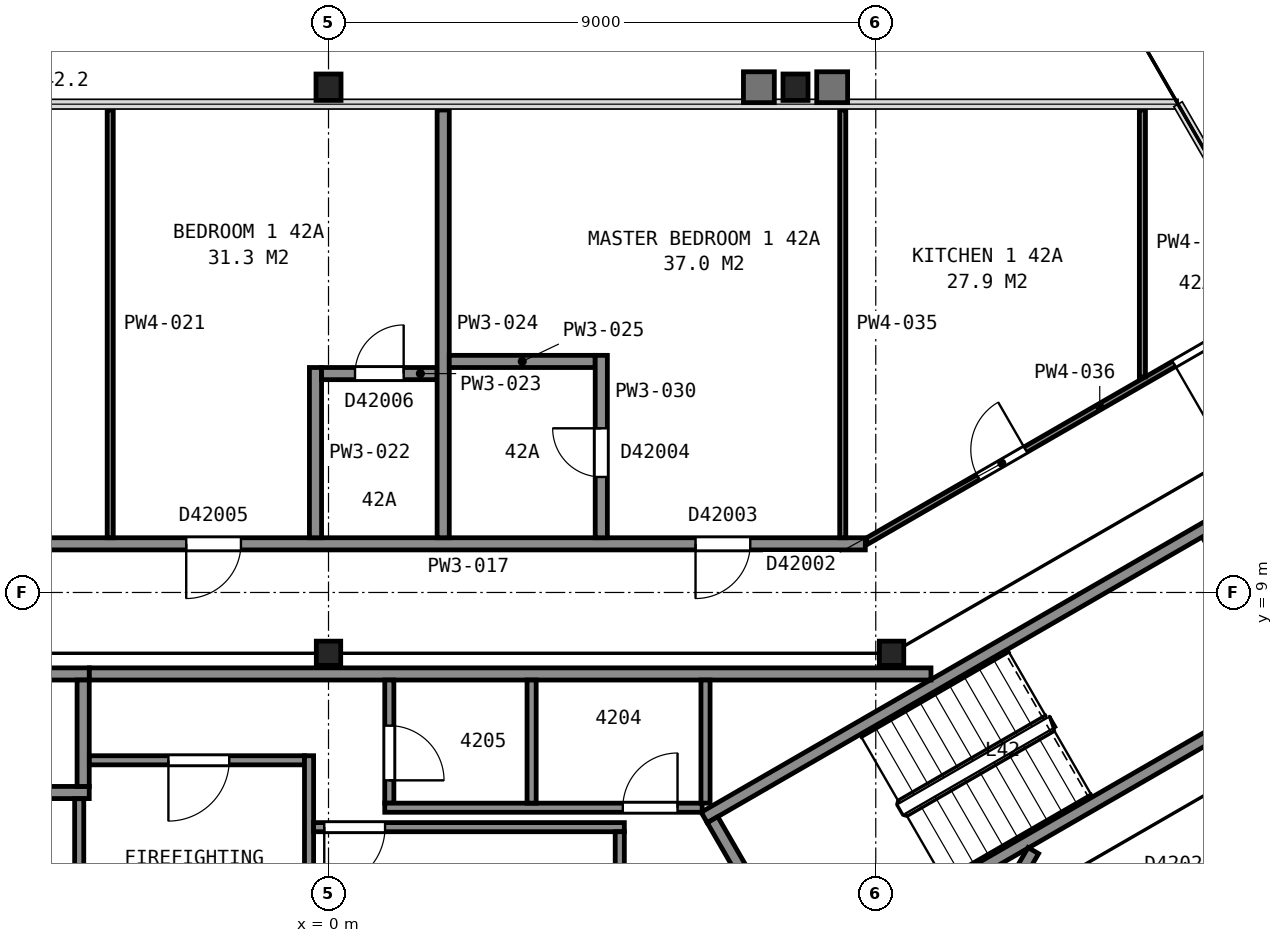
"""IFC4 building model, lengths in metres.
Left out: names, types, materials, properties, quantities, classifications, styles, units other than length and angle.
Written with IfcOpenShell. Run it as: python <this file> out.ifc"""

import sys

from ifc_helpers import new_model, si_unit, direction, frame, frame_2d, origin, origin_2d, place, context, subcontext, project, spatial, rectangle, i_section, extrude, element, fill, save


model = new_model("IFC4")
c1 = context("Model", 3, precision=1e-05, world=origin(), true_north=direction((0.0, 1.0)))
c2 = subcontext(c1, "Body", "Model", "MODEL_VIEW")
j1 = project(units=[si_unit("LENGTHUNIT", "METRE"), si_unit("PLANEANGLEUNIT", "RADIAN")], contexts=[c1])
p1 = place(None, origin())
s1 = spatial("IfcSite", under=j1, at=p1, CompositionType="ELEMENT")
p2 = place(p1, origin())
s2 = spatial("IfcBuilding", under=s1, at=p2, CompositionType="ELEMENT")
p3 = place(p2, frame((0.0, 0.0, 171.0)))
s3 = spatial("IfcBuildingStorey", under=s2, at=p3, CompositionType="ELEMENT", Elevation=171.0)
for number, where, z_axis, x_axis in (
    (1, (7.68, 17.31, 0.0), (0.0, 0.0, 1.0), (1.0, 0.0, 0.0)),
    (2, (0.0, 17.31, 0.0), (0.0, 0.0, 1.0), (1.0, 0.0, 0.0)),
):
    element("IfcColumn", number, at=place(p3, frame(where, z_axis=z_axis, x_axis=x_axis)), inside=s3, PredefinedType="COLUMN", context=c2, shape_type="SweptSolid", body=[
        extrude(i_section(OverallWidth=0.411, OverallDepth=0.434, WebThickness=0.036, FlangeThickness=0.057, FilletRadius=0.015, at=origin_2d()), origin(), (0.0, 0.0, 1.0), 3.665),
    ])
for number, where, z_axis, x_axis in (
    (3, (9.26, 8.0, 0.0), (0.0, 0.0, 1.0), (1.0, 0.0, 0.0)),
    (4, (0.0, 8.0, 0.0), (0.0, 0.0, 1.0), (1.0, 0.0, 0.0)),
):
    element("IfcColumn", number, at=place(p3, frame(where, z_axis=z_axis, x_axis=x_axis)), inside=s3, PredefinedType="COLUMN", context=c2, shape_type="SweptSolid", body=[
        extrude(i_section(OverallWidth=0.401, OverallDepth=0.399, WebThickness=0.025, FlangeThickness=0.04, FilletRadius=0.015, at=origin_2d()), origin(), (0.0, 0.0, 1.0), 3.7),
    ])
p4 = place(p3, frame((15.855, 7.538, 0.0), z_axis=(0.0, 0.0, 1.0), x_axis=(-0.500049511043, 0.865996816683, 0.0)))
e5 = element("IfcWall", 5, at=p4, inside=s3, PredefinedType="PARTITIONING", context=c2, shape_type="SweptSolid", body=[
    extrude(rectangle(XDim=2.8, YDim=0.2, at=frame_2d((1.4, 0.0))), origin(), (0.0, 0.0, 1.0), 3.45),
])
p5 = place(p4, frame((0.85, 0.0, 0.0)))
e6 = element("IfcOpeningElement", 6, at=p5, cuts=e5, PredefinedType="OPENING", context=c2, shape_type="SweptSolid", body=[
    extrude(rectangle(XDim=1.1, YDim=2.1, at=frame_2d((0.55, 1.05))), frame((0.0, 0.11, 0.0), z_axis=(0.0, -1.0, 0.0), x_axis=(1.0, 0.0, 0.0)), (0.0, 0.0, 1.0), 0.22),
])
for number, where, z_axis, x_axis in (
    (7, (6.178, 5.299, 0.0), (0.0, 0.0, 1.0), (0.866, 0.5, 0.0)),
    (8, (7.678, 2.701, 0.0), (0.0, 0.0, 1.0), (0.866, 0.5, 0.0)),
):
    element("IfcWall", number, at=place(p3, frame(where, z_axis=z_axis, x_axis=x_axis)), inside=s3, PredefinedType="PARTITIONING", context=c2, shape_type="SweptSolid", body=[
        extrude(rectangle(XDim=9.6, YDim=0.2, at=frame_2d((4.8, 0.0))), origin(), (0.0, 0.0, 1.0), 3.45),
    ])
p6 = place(p3, frame((7.715, 2.838, 0.0), z_axis=(0.0, 0.0, 1.0), x_axis=(-0.500049511043, 0.865996816683, 0.0)))
e9 = element("IfcWall", 9, at=p6, inside=s3, PredefinedType="PARTITIONING", context=c2, shape_type="SweptSolid", body=[
    extrude(rectangle(XDim=2.8, YDim=0.2, at=frame_2d((1.4, 0.0))), origin(), (0.0, 0.0, 1.0), 3.45),
])
for number, where, z_axis, x_axis in (
    (10, (-6.285, 5.71, 0.0), (0.0, 0.0, 1.0), (1.0, 0.0, 0.0)),
    (11, (-6.285, 7.66, 0.0), (0.0, 0.0, 1.0), (1.0, 0.0, 0.0)),
):
    element("IfcWall", number, at=place(p3, frame(where, z_axis=z_axis, x_axis=x_axis)), inside=s3, PredefinedType="PARTITIONING", context=c2, shape_type="SweptSolid", body=[
        extrude(rectangle(XDim=2.35, YDim=0.2, at=frame_2d((1.175, 0.0))), origin(), (0.0, 0.0, 1.0), 3.7),
    ])
p7 = place(p3, frame((-4.035, 5.81, 0.0), z_axis=(0.0, 0.0, 1.0), x_axis=(0.0, 1.0, 0.0)))
e12 = element("IfcWall", 12, at=p7, inside=s3, PredefinedType="PARTITIONING", context=c2, shape_type="SweptSolid", body=[
    extrude(rectangle(XDim=1.75, YDim=0.2, at=frame_2d((0.875, 0.0))), origin(), (0.0, 0.0, 1.0), 3.7),
])
p8 = place(p3, frame((-4.1, 2.085, 0.0), z_axis=(0.0, 0.0, 1.0), x_axis=(0.0, 1.0, 0.0)))
e13 = element("IfcWall", 13, at=p8, inside=s3, PredefinedType="PARTITIONING", context=c2, shape_type="SweptSolid", body=[
    extrude(rectangle(XDim=3.523, YDim=0.15, at=frame_2d((1.761, 0.0))), origin(), (0.0, 0.0, 1.0), 3.45),
])
p9 = place(p3, frame((-3.933, 6.24, 0.0), z_axis=(0.0, 0.0, 1.0), x_axis=(1.0, 0.0, 0.0)))
e14 = element("IfcWall", 14, at=p9, inside=s3, PredefinedType="PARTITIONING", context=c2, shape_type="SweptSolid", body=[
    extrude(rectangle(XDim=3.538, YDim=0.15, at=frame_2d((1.769, 0.0))), origin(), (0.0, 0.0, 1.0), 3.45),
])
p10 = place(p9, frame((1.3, 0.0, 0.0)))
e15 = element("IfcOpeningElement", 15, at=p10, cuts=e14, PredefinedType="OPENING", context=c2, shape_type="SweptSolid", body=[
    extrude(rectangle(XDim=1.0, YDim=2.1, at=frame_2d((0.5, 1.05))), frame((0.0, 0.085, 0.0), z_axis=(0.0, -1.0, 0.0), x_axis=(1.0, 0.0, 0.0)), (0.0, 0.0, 1.0), 0.17),
])
p11 = place(p3, frame((-3.933, 7.66, 0.0), z_axis=(0.0, 0.0, 1.0), x_axis=(1.0, 0.0, 0.0)))
e16 = element("IfcWall", 16, at=p11, inside=s3, PredefinedType="PARTITIONING", context=c2, shape_type="SweptSolid", body=[
    extrude(rectangle(XDim=13.841, YDim=0.2, at=frame_2d((6.92, 0.0))), origin(), (0.0, 0.0, 1.0), 3.45),
])
p12 = place(p3, frame((-0.32, 2.252, 0.0), z_axis=(0.0, 0.0, 1.0), x_axis=(0.0, 1.0, 0.0)))
e17 = element("IfcWall", 17, at=p12, inside=s3, PredefinedType="PARTITIONING", context=c2, shape_type="SweptSolid", body=[
    extrude(rectangle(XDim=4.063, YDim=0.15, at=frame_2d((2.031, 0.0))), origin(), (0.0, 0.0, 1.0), 3.45),
])
p13 = place(p3, frame((-0.245, 5.14, 0.0), z_axis=(0.0, 0.0, 1.0), x_axis=(1.0, 0.0, 0.0)))
e18 = element("IfcWall", 18, at=p13, inside=s3, PredefinedType="PARTITIONING", context=c2, shape_type="SweptSolid", body=[
    extrude(rectangle(XDim=5.11, YDim=0.15, at=frame_2d((2.555, 0.0))), origin(), (0.0, 0.0, 1.0), 3.45),
])
p14 = place(p13, frame((0.175, 0.0, 0.0)))
e19 = element("IfcOpeningElement", 19, at=p14, cuts=e18, PredefinedType="OPENING", context=c2, shape_type="SweptSolid", body=[
    extrude(rectangle(XDim=1.0, YDim=2.1, at=frame_2d((0.5, 1.05))), frame((0.0, 0.085, 0.0), z_axis=(0.0, -1.0, 0.0), x_axis=(1.0, 0.0, 0.0)), (0.0, 0.0, 1.0), 0.17),
])
p15 = place(p3, frame((1.0, 7.56, 0.0), z_axis=(0.0, 0.0, 1.0), x_axis=(0.0, -1.0, 0.0)))
e20 = element("IfcWall", 20, at=p15, inside=s3, PredefinedType="PARTITIONING", context=c2, shape_type="SweptSolid", body=[
    extrude(rectangle(XDim=2.025, YDim=0.15, at=frame_2d((1.013, 0.0))), origin(), (0.0, 0.0, 1.0), 3.45),
])
p16 = place(p15, frame((0.75, 0.0, 0.0)))
e21 = element("IfcOpeningElement", 21, at=p16, cuts=e20, PredefinedType="OPENING", context=c2, shape_type="SweptSolid", body=[
    extrude(rectangle(XDim=0.9, YDim=2.1, at=frame_2d((0.45, 1.05))), frame((0.0, 0.085, 0.0), z_axis=(0.0, -1.0, 0.0), x_axis=(1.0, 0.0, 0.0)), (0.0, 0.0, 1.0), 0.17),
])
p17 = place(p3, frame((0.925, 5.46, 0.0), z_axis=(0.0, 0.0, 1.0), x_axis=(1.0, 0.0, 0.0)))
e22 = element("IfcWall", 22, at=p17, inside=s3, PredefinedType="PARTITIONING", context=c2, shape_type="SweptSolid", body=[
    extrude(rectangle(XDim=5.22, YDim=0.15, at=frame_2d((2.61, 0.0))), origin(), (0.0, 0.0, 1.0), 3.45),
])
p18 = place(p17, frame((3.915, 0.0, 0.0)))
e23 = element("IfcOpeningElement", 23, at=p18, cuts=e22, PredefinedType="OPENING", context=c2, shape_type="SweptSolid", body=[
    extrude(rectangle(XDim=0.9, YDim=2.1, at=frame_2d((0.45, 1.05))), frame((0.0, 0.085, 0.0), z_axis=(0.0, -1.0, 0.0), x_axis=(1.0, 0.0, 0.0)), (0.0, 0.0, 1.0), 0.17),
])
p19 = place(p3, frame((3.34, 5.535, 0.0), z_axis=(0.0, 0.0, 1.0), x_axis=(0.0, 1.0, 0.0)))
e24 = element("IfcWall", 24, at=p19, inside=s3, PredefinedType="PARTITIONING", context=c2, shape_type="SweptSolid", body=[
    extrude(rectangle(XDim=2.025, YDim=0.15, at=frame_2d((1.013, 0.0))), origin(), (0.0, 0.0, 1.0), 3.45),
])
p20 = place(p3, frame((4.79, 2.085, 0.0), z_axis=(0.0, 0.0, 1.0), x_axis=(0.0, 1.0, 0.0)))
e25 = element("IfcWall", 25, at=p20, inside=s3, PredefinedType="PARTITIONING", context=c2, shape_type="SweptSolid", body=[
    extrude(rectangle(XDim=2.98, YDim=0.15, at=frame_2d((1.49, 0.0))), origin(), (0.0, 0.0, 1.0), 3.45),
])
p21 = place(p3, frame((6.2, 5.535, 0.0), z_axis=(0.0, 0.0, 1.0), x_axis=(0.0, 1.0, 0.0)))
e26 = element("IfcWall", 26, at=p21, inside=s3, PredefinedType="PARTITIONING", context=c2, shape_type="SweptSolid", body=[
    extrude(rectangle(XDim=2.025, YDim=0.15, at=frame_2d((1.013, 0.0))), origin(), (0.0, 0.0, 1.0), 3.45),
])
p22 = place(p3, frame((9.803, 1.658, 0.0), z_axis=(0.0, 0.0, 1.0), x_axis=(0.499943114462, 0.866058244174, 0.0)))
e27 = element("IfcWall", 27, at=p22, inside=s3, PredefinedType="PARTITIONING", context=c2, shape_type="SweptSolid", body=[
    extrude(rectangle(XDim=3.576, YDim=0.2, at=frame_2d((1.788, 0.0))), origin(), (0.0, 0.0, 1.0), 3.45),
])
p23 = place(p3, frame((-8.828, 9.8, 0.0), z_axis=(0.0, 0.0, 1.0), x_axis=(1.0, 0.0, 0.0)))
e28 = element("IfcWall", 28, at=p23, inside=s3, PredefinedType="PARTITIONING", context=c2, shape_type="SweptSolid", body=[
    extrude(rectangle(XDim=17.656, YDim=0.2, at=frame_2d((8.828, 0.0))), origin(), (0.0, 0.0, 1.0), 2.713),
])
p24 = place(p23, frame((14.864, 0.0, 0.0)))
e29 = element("IfcOpeningElement", 29, at=p24, cuts=e28, PredefinedType="OPENING", context=c2, shape_type="SweptSolid", body=[
    extrude(rectangle(XDim=0.9, YDim=2.1, at=frame_2d((0.45, 1.05))), frame((0.0, 0.11, 0.0), z_axis=(0.0, -1.0, 0.0), x_axis=(1.0, 0.0, 0.0)), (0.0, 0.0, 1.0), 0.22),
])
p25 = place(p23, frame((6.488, 0.0, 0.0)))
e30 = element("IfcOpeningElement", 30, at=p25, cuts=e28, PredefinedType="OPENING", context=c2, shape_type="SweptSolid", body=[
    extrude(rectangle(XDim=0.9, YDim=2.1, at=frame_2d((0.45, 1.05))), frame((0.0, 0.11, 0.0), z_axis=(0.0, -1.0, 0.0), x_axis=(1.0, 0.0, 0.0)), (0.0, 0.0, 1.0), 0.22),
])
p26 = place(p23, frame((2.2, 0.0, 0.0)))
e31 = element("IfcOpeningElement", 31, at=p26, cuts=e28, PredefinedType="OPENING", context=c2, shape_type="SweptSolid", body=[
    extrude(rectangle(XDim=0.9, YDim=2.1, at=frame_2d((0.45, 1.05))), frame((0.0, 0.11, 0.0), z_axis=(0.0, -1.0, 0.0), x_axis=(1.0, 0.0, 0.0)), (0.0, 0.0, 1.0), 0.22),
])
p27 = place(p3, frame((-3.59, 9.9, 0.0), z_axis=(0.0, 0.0, 1.0), x_axis=(0.0, 1.0, 0.0)))
e32 = element("IfcWall", 32, at=p27, inside=s3, PredefinedType="PARTITIONING", context=c2, shape_type="SweptSolid", body=[
    extrude(rectangle(XDim=7.035, YDim=0.1, at=frame_2d((3.518, 0.0))), origin(), (0.0, 0.0, 1.0), 2.713),
])
p28 = place(p3, frame((-0.214, 9.9, 0.0), z_axis=(0.0, 0.0, 1.0), x_axis=(0.0, 1.0, 0.0)))
e33 = element("IfcWall", 33, at=p28, inside=s3, PredefinedType="PARTITIONING", context=c2, shape_type="SweptSolid", body=[
    extrude(rectangle(XDim=2.8, YDim=0.2, at=frame_2d((1.4, 0.0))), origin(), (0.0, 0.0, 1.0), 2.713),
])
p29 = place(p3, frame((1.786, 12.6, 0.0), z_axis=(0.0, 0.0, 1.0), x_axis=(-1.0, 0.0, 0.0)))
e34 = element("IfcWall", 34, at=p29, inside=s3, PredefinedType="PARTITIONING", context=c2, shape_type="SweptSolid", body=[
    extrude(rectangle(XDim=1.9, YDim=0.2, at=frame_2d((0.95, 0.0))), origin(), (0.0, 0.0, 1.0), 2.713),
])
p30 = place(p29, frame((0.55, 0.0, 0.0)))
e35 = element("IfcOpeningElement", 35, at=p30, cuts=e34, PredefinedType="OPENING", context=c2, shape_type="SweptSolid", body=[
    extrude(rectangle(XDim=0.8, YDim=2.1, at=frame_2d((0.4, 1.05))), frame((0.0, 0.11, 0.0), z_axis=(0.0, -1.0, 0.0), x_axis=(1.0, 0.0, 0.0)), (0.0, 0.0, 1.0), 0.22),
])
p31 = place(p3, frame((1.886, 9.9, 0.0), z_axis=(0.0, 0.0, 1.0), x_axis=(0.0, 1.0, 0.0)))
e36 = element("IfcWall", 36, at=p31, inside=s3, PredefinedType="PARTITIONING", context=c2, shape_type="SweptSolid", body=[
    extrude(rectangle(XDim=7.035, YDim=0.2, at=frame_2d((3.518, 0.0))), origin(), (0.0, 0.0, 1.0), 2.713),
])
p32 = place(p3, frame((1.986, 12.8, 0.0), z_axis=(0.0, 0.0, 1.0), x_axis=(1.0, 0.0, 0.0)))
e37 = element("IfcWall", 37, at=p32, inside=s3, PredefinedType="PARTITIONING", context=c2, shape_type="SweptSolid", body=[
    extrude(rectangle(XDim=2.4, YDim=0.2, at=frame_2d((1.2, 0.0))), origin(), (0.0, 0.0, 1.0), 2.713),
])
p33 = place(p3, frame((4.486, 9.9, 0.0), z_axis=(0.0, 0.0, 1.0), x_axis=(0.0, 1.0, 0.0)))
e38 = element("IfcWall", 38, at=p33, inside=s3, PredefinedType="PARTITIONING", context=c2, shape_type="SweptSolid", body=[
    extrude(rectangle(XDim=3.0, YDim=0.2, at=frame_2d((1.5, 0.0))), origin(), (0.0, 0.0, 1.0), 2.713),
])
p34 = place(p33, frame((1.0, 0.0, 0.0)))
e39 = element("IfcOpeningElement", 39, at=p34, cuts=e38, PredefinedType="OPENING", context=c2, shape_type="SweptSolid", body=[
    extrude(rectangle(XDim=0.8, YDim=2.1, at=frame_2d((0.4, 1.05))), frame((0.0, 0.11, 0.0), z_axis=(0.0, -1.0, 0.0), x_axis=(1.0, 0.0, 0.0)), (0.0, 0.0, 1.0), 0.22),
])
p35 = place(p3, frame((8.457, 9.9, 0.0), z_axis=(0.0, 0.0, 1.0), x_axis=(0.0, 1.0, 0.0)))
e40 = element("IfcWall", 40, at=p35, inside=s3, PredefinedType="PARTITIONING", context=c2, shape_type="SweptSolid", body=[
    extrude(rectangle(XDim=7.035, YDim=0.1, at=frame_2d((3.518, 0.0))), origin(), (0.0, 0.0, 1.0), 2.713),
])
p36 = place(p3, frame((8.852, 9.843, 0.0), z_axis=(0.0, 0.0, 1.0), x_axis=(0.866086037714, 0.499894964244, 0.0)))
e41 = element("IfcWall", 41, at=p36, inside=s3, PredefinedType="PARTITIONING", context=c2, shape_type="SweptSolid", body=[
    extrude(rectangle(XDim=7.963, YDim=0.1, at=frame_2d((3.981, 0.0))), origin(), (0.0, 0.0, 1.0), 2.713),
])
p37 = place(p36, frame((5.834, 0.0, 0.0)))
e42 = element("IfcOpeningElement", 42, at=p37, cuts=e41, PredefinedType="OPENING", context=c2, shape_type="SweptSolid", body=[
    extrude(rectangle(XDim=1.5, YDim=2.1, at=frame_2d((0.75, 1.05))), frame((0.0, 0.06, 0.0), z_axis=(0.0, -1.0, 0.0), x_axis=(1.0, 0.0, 0.0)), (0.0, 0.0, 1.0), 0.12),
])
p38 = place(p36, frame((2.115, 0.0, 0.0)))
e43 = element("IfcOpeningElement", 43, at=p38, cuts=e41, PredefinedType="OPENING", context=c2, shape_type="SweptSolid", body=[
    extrude(rectangle(XDim=0.9, YDim=2.1, at=frame_2d((0.45, 1.05))), frame((0.0, 0.06, 0.0), z_axis=(0.0, -1.0, 0.0), x_axis=(1.0, 0.0, 0.0)), (0.0, 0.0, 1.0), 0.12),
])
p39 = place(p3, frame((19.847, 6.725, 0.0), z_axis=(0.0, 0.0, 1.0), x_axis=(-0.866069747624, -0.499923186351, 0.0)))
e44 = element("IfcWall", 44, at=p39, inside=s3, PredefinedType="PARTITIONING", context=c2, shape_type="SweptSolid", body=[
    extrude(rectangle(XDim=7.931, YDim=0.15, at=frame_2d((3.966, 0.0))), origin(), (0.0, 0.0, 1.0), 2.713),
])
p40 = place(p39, frame((0.928, 0.0, 0.0)))
e45 = element("IfcOpeningElement", 45, at=p40, cuts=e44, PredefinedType="OPENING", context=c2, shape_type="SweptSolid", body=[
    extrude(rectangle(XDim=1.0, YDim=2.1, at=frame_2d((0.5, 1.05))), frame((0.0, 0.085, 0.0), z_axis=(0.0, -1.0, 0.0), x_axis=(1.0, 0.0, 0.0)), (0.0, 0.0, 1.0), 0.17),
])
p41 = place(p3, frame((13.385, 12.546, 0.0), z_axis=(0.0, 0.0, 1.0), x_axis=(0.0, 1.0, 0.0)))
e46 = element("IfcWall", 46, at=p41, inside=s3, PredefinedType="PARTITIONING", context=c2, shape_type="SweptSolid", body=[
    extrude(rectangle(XDim=4.389, YDim=0.1, at=frame_2d((2.195, 0.0))), origin(), (0.0, 0.0, 1.0), 2.713),
])
p42 = place(p10, origin())
e47 = element("IfcDoor", 47, at=p42, inside=s3, OperationType="SINGLE_SWING_LEFT", PredefinedType="DOOR", context=c2, shape_type="SweptSolid", body=[
    extrude(rectangle(XDim=1.0, YDim=2.1, at=frame_2d((0.5, 1.05))), frame((0.0, 0.025, 0.0), z_axis=(0.0, -1.0, 0.0), x_axis=(1.0, 0.0, 0.0)), (0.0, 0.0, 1.0), 0.05),
])
fill(e15, e47)
p43 = place(p14, origin())
e48 = element("IfcDoor", 48, at=p43, inside=s3, OperationType="SINGLE_SWING_LEFT", PredefinedType="DOOR", context=c2, shape_type="SweptSolid", body=[
    extrude(rectangle(XDim=1.0, YDim=2.1, at=frame_2d((0.5, 1.05))), frame((0.0, 0.025, 0.0), z_axis=(0.0, -1.0, 0.0), x_axis=(1.0, 0.0, 0.0)), (0.0, 0.0, 1.0), 0.05),
])
fill(e19, e48)
p44 = place(p16, origin())
e49 = element("IfcDoor", 49, at=p44, inside=s3, OperationType="SINGLE_SWING_RIGHT", PredefinedType="DOOR", context=c2, shape_type="SweptSolid", body=[
    extrude(rectangle(XDim=0.9, YDim=2.1, at=frame_2d((0.45, 1.05))), frame((0.0, 0.025, 0.0), z_axis=(0.0, -1.0, 0.0), x_axis=(1.0, 0.0, 0.0)), (0.0, 0.0, 1.0), 0.05),
])
fill(e21, e49)
p45 = place(p18, origin())
e50 = element("IfcDoor", 50, at=p45, inside=s3, OperationType="SINGLE_SWING_RIGHT", PredefinedType="DOOR", context=c2, shape_type="SweptSolid", body=[
    extrude(rectangle(XDim=0.9, YDim=2.1, at=frame_2d((0.45, 1.05))), frame((0.0, 0.025, 0.0), z_axis=(0.0, -1.0, 0.0), x_axis=(1.0, 0.0, 0.0)), (0.0, 0.0, 1.0), 0.05),
])
fill(e23, e50)
p46 = place(p24, origin())
e51 = element("IfcDoor", 51, at=p46, inside=s3, OperationType="SINGLE_SWING_LEFT", PredefinedType="DOOR", context=c2, shape_type="SweptSolid", body=[
    extrude(rectangle(XDim=0.9, YDim=2.1, at=frame_2d((0.45, 1.05))), frame((0.0, 0.025, 0.0), z_axis=(0.0, -1.0, 0.0), x_axis=(1.0, 0.0, 0.0)), (0.0, 0.0, 1.0), 0.05),
])
fill(e29, e51)
p47 = place(p25, origin())
e52 = element("IfcDoor", 52, at=p47, inside=s3, OperationType="SINGLE_SWING_LEFT", PredefinedType="DOOR", context=c2, shape_type="SweptSolid", body=[
    extrude(rectangle(XDim=0.9, YDim=2.1, at=frame_2d((0.45, 1.05))), frame((0.0, 0.025, 0.0), z_axis=(0.0, -1.0, 0.0), x_axis=(1.0, 0.0, 0.0)), (0.0, 0.0, 1.0), 0.05),
])
fill(e30, e52)
p48 = place(p30, origin())
e53 = element("IfcDoor", 53, at=p48, inside=s3, OperationType="SINGLE_SWING_LEFT", PredefinedType="DOOR", context=c2, shape_type="SweptSolid", body=[
    extrude(rectangle(XDim=0.8, YDim=2.1, at=frame_2d((0.4, 1.05))), frame((0.0, 0.025, 0.0), z_axis=(0.0, -1.0, 0.0), x_axis=(1.0, 0.0, 0.0)), (0.0, 0.0, 1.0), 0.05),
])
fill(e35, e53)
p49 = place(p34, origin())
e54 = element("IfcDoor", 54, at=p49, inside=s3, OperationType="SINGLE_SWING_RIGHT", PredefinedType="DOOR", context=c2, shape_type="SweptSolid", body=[
    extrude(rectangle(XDim=0.8, YDim=2.1, at=frame_2d((0.4, 1.05))), frame((0.0, 0.025, 0.0), z_axis=(0.0, -1.0, 0.0), x_axis=(1.0, 0.0, 0.0)), (0.0, 0.0, 1.0), 0.05),
])
fill(e39, e54)
p50 = place(p37, origin())
e55 = element("IfcDoor", 55, at=p50, inside=s3, OperationType="DOUBLE_DOOR_SINGLE_SWING", PredefinedType="DOOR", context=c2, shape_type="SweptSolid", body=[
    extrude(rectangle(XDim=1.5, YDim=2.1, at=frame_2d((0.75, 1.05))), frame((0.0, 0.025, 0.0), z_axis=(0.0, -1.0, 0.0), x_axis=(1.0, 0.0, 0.0)), (0.0, 0.0, 1.0), 0.05),
])
fill(e42, e55)
p51 = place(p38, origin())
e56 = element("IfcDoor", 56, at=p51, inside=s3, OperationType="SINGLE_SWING_RIGHT", PredefinedType="DOOR", context=c2, shape_type="SweptSolid", body=[
    extrude(rectangle(XDim=0.9, YDim=2.1, at=frame_2d((0.45, 1.05))), frame((0.0, 0.025, 0.0), z_axis=(0.0, -1.0, 0.0), x_axis=(1.0, 0.0, 0.0)), (0.0, 0.0, 1.0), 0.05),
])
fill(e43, e56)
save(model, sys.argv[1])
